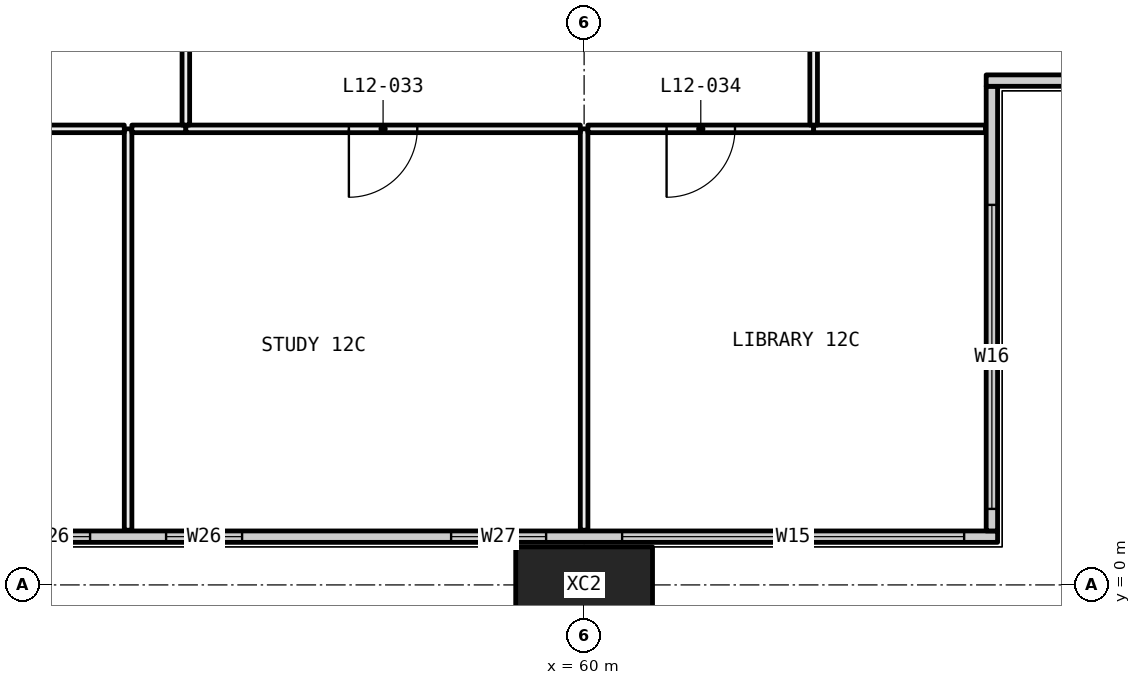
"""IFC4 building model, lengths in metres.
Left out: names, types, materials, properties, quantities, classifications, styles, units other than length and angle.
Written with IfcOpenShell. Run it as: python <this file> out.ifc"""

import sys

from ifc_helpers import new_model, si_unit, direction, frame, frame_2d, origin, origin_2d, place, context, subcontext, project, spatial, rectangle, hollow_rectangle, extrude, element, fill, save


model = new_model("IFC4")
c1 = context("Model", 3, precision=1e-05, world=origin(), true_north=direction((0.0, 1.0)))
c2 = subcontext(c1, "Body", "Model", "MODEL_VIEW")
j1 = project(units=[si_unit("LENGTHUNIT", "METRE"), si_unit("PLANEANGLEUNIT", "RADIAN")], contexts=[c1])
p1 = place(None, origin())
s1 = spatial("IfcSite", under=j1, at=p1, CompositionType="ELEMENT")
p2 = place(p1, origin())
s2 = spatial("IfcBuilding", under=s1, at=p2, CompositionType="ELEMENT")
p3 = place(p2, frame((0.0, 0.0, 54.15)))
s3 = spatial("IfcBuildingStorey", under=s2, at=p3, CompositionType="ELEMENT", Elevation=54.15)
p4 = place(p3, frame((60.0, 0.0, -0.4), z_axis=(0.0, 0.0, 1.0), x_axis=(1.0, 0.0, 0.0)))
e1 = element("IfcColumn", 1, at=p4, inside=s3, PredefinedType="COLUMN", context=c2, shape_type="SweptSolid", body=[
    extrude(hollow_rectangle(XDim=1.8, YDim=1.0, WallThickness=0.07, at=origin_2d()), origin(), (0.0, 0.0, 1.0), 3.45),
])
p5 = place(p3, frame((6.56, 0.635, 0.0), z_axis=(0.0, 0.0, 1.0), x_axis=(1.0, 0.0, 0.0)))
e2 = element("IfcWall", 2, at=p5, inside=s3, PredefinedType="ELEMENTEDWALL", context=c2, shape_type="SweptSolid", body=[
    extrude(rectangle(XDim=58.88, YDim=0.15, at=frame_2d((29.44, 0.0))), origin(), (0.0, 0.0, 1.0), 3.05),
])
p6 = place(p5, frame((0.44, 0.0, 0.45)))
e3 = element("IfcOpeningElement", 3, at=p6, cuts=e2, PredefinedType="OPENING", context=c2, shape_type="SweptSolid", body=[
    extrude(rectangle(XDim=4.5, YDim=2.55, at=frame_2d((2.25, 1.275))), frame((0.0, 0.085, 0.0), z_axis=(0.0, -1.0, 0.0), x_axis=(1.0, 0.0, 0.0)), (0.0, 0.0, 1.0), 0.17),
])
p7 = place(p5, frame((5.94, 0.0, 0.45)))
e4 = element("IfcOpeningElement", 4, at=p7, cuts=e2, PredefinedType="OPENING", context=c2, shape_type="SweptSolid", body=[
    extrude(rectangle(XDim=1.25, YDim=2.55, at=frame_2d((0.625, 1.275))), frame((0.0, 0.085, 0.0), z_axis=(0.0, -1.0, 0.0), x_axis=(1.0, 0.0, 0.0)), (0.0, 0.0, 1.0), 0.17),
])
p8 = place(p5, frame((9.94, 0.0, 0.45)))
e5 = element("IfcOpeningElement", 5, at=p8, cuts=e2, PredefinedType="OPENING", context=c2, shape_type="SweptSolid", body=[
    extrude(rectangle(XDim=1.0, YDim=2.55, at=frame_2d((0.5, 1.275))), frame((0.0, 0.085, 0.0), z_axis=(0.0, -1.0, 0.0), x_axis=(1.0, 0.0, 0.0)), (0.0, 0.0, 1.0), 0.17),
])
p9 = place(p5, frame((11.94, 0.0, 0.45)))
e6 = element("IfcOpeningElement", 6, at=p9, cuts=e2, PredefinedType="OPENING", context=c2, shape_type="SweptSolid", body=[
    extrude(rectangle(XDim=1.0, YDim=2.55, at=frame_2d((0.5, 1.275))), frame((0.0, 0.085, 0.0), z_axis=(0.0, -1.0, 0.0), x_axis=(1.0, 0.0, 0.0)), (0.0, 0.0, 1.0), 0.17),
])
p10 = place(p5, frame((15.69, 0.0, 0.45)))
e7 = element("IfcOpeningElement", 7, at=p10, cuts=e2, PredefinedType="OPENING", context=c2, shape_type="SweptSolid", body=[
    extrude(rectangle(XDim=1.25, YDim=2.55, at=frame_2d((0.625, 1.275))), frame((0.0, 0.085, 0.0), z_axis=(0.0, -1.0, 0.0), x_axis=(1.0, 0.0, 0.0)), (0.0, 0.0, 1.0), 0.17),
])
p11 = place(p5, frame((17.94, 0.0, 0.45)))
e8 = element("IfcOpeningElement", 8, at=p11, cuts=e2, PredefinedType="OPENING", context=c2, shape_type="SweptSolid", body=[
    extrude(rectangle(XDim=1.25, YDim=2.55, at=frame_2d((0.625, 1.275))), frame((0.0, 0.085, 0.0), z_axis=(0.0, -1.0, 0.0), x_axis=(1.0, 0.0, 0.0)), (0.0, 0.0, 1.0), 0.17),
])
p12 = place(p5, frame((21.94, 0.0, 0.45)))
e9 = element("IfcOpeningElement", 9, at=p12, cuts=e2, PredefinedType="OPENING", context=c2, shape_type="SweptSolid", body=[
    extrude(rectangle(XDim=1.0, YDim=2.55, at=frame_2d((0.5, 1.275))), frame((0.0, 0.085, 0.0), z_axis=(0.0, -1.0, 0.0), x_axis=(1.0, 0.0, 0.0)), (0.0, 0.0, 1.0), 0.17),
])
p13 = place(p5, frame((23.94, 0.0, 0.45)))
e10 = element("IfcOpeningElement", 10, at=p13, cuts=e2, PredefinedType="OPENING", context=c2, shape_type="SweptSolid", body=[
    extrude(rectangle(XDim=1.0, YDim=2.55, at=frame_2d((0.5, 1.275))), frame((0.0, 0.085, 0.0), z_axis=(0.0, -1.0, 0.0), x_axis=(1.0, 0.0, 0.0)), (0.0, 0.0, 1.0), 0.17),
])
p14 = place(p5, frame((27.69, 0.0, 0.45)))
e11 = element("IfcOpeningElement", 11, at=p14, cuts=e2, PredefinedType="OPENING", context=c2, shape_type="SweptSolid", body=[
    extrude(rectangle(XDim=1.25, YDim=2.55, at=frame_2d((0.625, 1.275))), frame((0.0, 0.085, 0.0), z_axis=(0.0, -1.0, 0.0), x_axis=(1.0, 0.0, 0.0)), (0.0, 0.0, 1.0), 0.17),
])
p15 = place(p5, frame((29.94, 0.0, 0.45)))
e12 = element("IfcOpeningElement", 12, at=p15, cuts=e2, PredefinedType="OPENING", context=c2, shape_type="SweptSolid", body=[
    extrude(rectangle(XDim=1.25, YDim=2.55, at=frame_2d((0.625, 1.275))), frame((0.0, 0.085, 0.0), z_axis=(0.0, -1.0, 0.0), x_axis=(1.0, 0.0, 0.0)), (0.0, 0.0, 1.0), 0.17),
])
p16 = place(p5, frame((33.94, 0.0, 0.45)))
e13 = element("IfcOpeningElement", 13, at=p16, cuts=e2, PredefinedType="OPENING", context=c2, shape_type="SweptSolid", body=[
    extrude(rectangle(XDim=1.0, YDim=2.55, at=frame_2d((0.5, 1.275))), frame((0.0, 0.085, 0.0), z_axis=(0.0, -1.0, 0.0), x_axis=(1.0, 0.0, 0.0)), (0.0, 0.0, 1.0), 0.17),
])
p17 = place(p5, frame((35.94, 0.0, 0.45)))
e14 = element("IfcOpeningElement", 14, at=p17, cuts=e2, PredefinedType="OPENING", context=c2, shape_type="SweptSolid", body=[
    extrude(rectangle(XDim=1.0, YDim=2.55, at=frame_2d((0.5, 1.275))), frame((0.0, 0.085, 0.0), z_axis=(0.0, -1.0, 0.0), x_axis=(1.0, 0.0, 0.0)), (0.0, 0.0, 1.0), 0.17),
])
p18 = place(p5, frame((39.69, 0.0, 0.45)))
e15 = element("IfcOpeningElement", 15, at=p18, cuts=e2, PredefinedType="OPENING", context=c2, shape_type="SweptSolid", body=[
    extrude(rectangle(XDim=1.25, YDim=2.55, at=frame_2d((0.625, 1.275))), frame((0.0, 0.085, 0.0), z_axis=(0.0, -1.0, 0.0), x_axis=(1.0, 0.0, 0.0)), (0.0, 0.0, 1.0), 0.17),
])
p19 = place(p5, frame((41.94, 0.0, 0.45)))
e16 = element("IfcOpeningElement", 16, at=p19, cuts=e2, PredefinedType="OPENING", context=c2, shape_type="SweptSolid", body=[
    extrude(rectangle(XDim=1.25, YDim=2.55, at=frame_2d((0.625, 1.275))), frame((0.0, 0.085, 0.0), z_axis=(0.0, -1.0, 0.0), x_axis=(1.0, 0.0, 0.0)), (0.0, 0.0, 1.0), 0.17),
])
p20 = place(p5, frame((45.94, 0.0, 0.45)))
e17 = element("IfcOpeningElement", 17, at=p20, cuts=e2, PredefinedType="OPENING", context=c2, shape_type="SweptSolid", body=[
    extrude(rectangle(XDim=1.0, YDim=2.55, at=frame_2d((0.5, 1.275))), frame((0.0, 0.085, 0.0), z_axis=(0.0, -1.0, 0.0), x_axis=(1.0, 0.0, 0.0)), (0.0, 0.0, 1.0), 0.17),
])
p21 = place(p5, frame((47.94, 0.0, 0.45)))
e18 = element("IfcOpeningElement", 18, at=p21, cuts=e2, PredefinedType="OPENING", context=c2, shape_type="SweptSolid", body=[
    extrude(rectangle(XDim=1.0, YDim=2.55, at=frame_2d((0.5, 1.275))), frame((0.0, 0.085, 0.0), z_axis=(0.0, -1.0, 0.0), x_axis=(1.0, 0.0, 0.0)), (0.0, 0.0, 1.0), 0.17),
])
p22 = place(p5, frame((51.69, 0.0, 0.45)))
e19 = element("IfcOpeningElement", 19, at=p22, cuts=e2, PredefinedType="OPENING", context=c2, shape_type="SweptSolid", body=[
    extrude(rectangle(XDim=1.25, YDim=2.55, at=frame_2d((0.625, 1.275))), frame((0.0, 0.085, 0.0), z_axis=(0.0, -1.0, 0.0), x_axis=(1.0, 0.0, 0.0)), (0.0, 0.0, 1.0), 0.17),
])
p23 = place(p5, frame((53.94, 0.0, 0.45)))
e20 = element("IfcOpeningElement", 20, at=p23, cuts=e2, PredefinedType="OPENING", context=c2, shape_type="SweptSolid", body=[
    extrude(rectangle(XDim=4.5, YDim=2.55, at=frame_2d((2.25, 1.275))), frame((0.0, 0.085, 0.0), z_axis=(0.0, -1.0, 0.0), x_axis=(1.0, 0.0, 0.0)), (0.0, 0.0, 1.0), 0.17),
])
p24 = place(p3, frame((65.365, 0.71, 0.0), z_axis=(0.0, 0.0, 1.0), x_axis=(0.0, 1.0, 0.0)))
e21 = element("IfcWall", 21, at=p24, inside=s3, PredefinedType="ELEMENTEDWALL", context=c2, shape_type="SweptSolid", body=[
    extrude(rectangle(XDim=5.85, YDim=0.15, at=frame_2d((2.925, 0.0))), origin(), (0.0, 0.0, 1.0), 3.05),
])
p25 = place(p24, frame((0.29, 0.0, 0.45)))
e22 = element("IfcOpeningElement", 22, at=p25, cuts=e21, PredefinedType="OPENING", context=c2, shape_type="SweptSolid", body=[
    extrude(rectangle(XDim=4.0, YDim=2.55, at=frame_2d((2.0, 1.275))), frame((0.0, 0.085, 0.0), z_axis=(0.0, -1.0, 0.0), x_axis=(1.0, 0.0, 0.0)), (0.0, 0.0, 1.0), 0.17),
])
p26 = place(p3, frame((65.29, 6.635, 0.0), z_axis=(0.0, 0.0, 1.0), x_axis=(1.0, 0.0, 0.0)))
e23 = element("IfcWall", 23, at=p26, inside=s3, PredefinedType="ELEMENTEDWALL", context=c2, shape_type="SweptSolid", body=[
    extrude(rectangle(XDim=6.15, YDim=0.15, at=frame_2d((3.075, 0.0))), origin(), (0.0, 0.0, 1.0), 3.05),
])
p27 = place(p26, frame((1.71, 0.0, 0.45)))
e24 = element("IfcOpeningElement", 24, at=p27, cuts=e23, PredefinedType="OPENING", context=c2, shape_type="SweptSolid", body=[
    extrude(rectangle(XDim=4.0, YDim=2.55, at=frame_2d((2.0, 1.275))), frame((0.0, 0.085, 0.0), z_axis=(0.0, -1.0, 0.0), x_axis=(1.0, 0.0, 0.0)), (0.0, 0.0, 1.0), 0.17),
])
p28 = place(p3, frame((54.0, 0.72, 0.0), z_axis=(0.0, 0.0, 1.0), x_axis=(0.0, 1.0, 0.0)))
e25 = element("IfcWall", 25, at=p28, inside=s3, PredefinedType="PARTITIONING", context=c2, shape_type="SweptSolid", body=[
    extrude(rectangle(XDim=5.28, YDim=0.1, at=frame_2d((2.64, 0.0))), origin(), (0.0, 0.0, 1.0), 3.05),
])
p29 = place(p3, frame((53.95, 6.0, 0.0), z_axis=(0.0, 0.0, 1.0), x_axis=(-1.0, 0.0, 0.0)))
e26 = element("IfcWall", 26, at=p29, inside=s3, PredefinedType="PARTITIONING", context=c2, shape_type="SweptSolid", body=[
    extrude(rectangle(XDim=5.9, YDim=0.1, at=frame_2d((2.95, 0.0))), origin(), (0.0, 0.0, 1.0), 2.45),
])
p30 = place(p29, frame((2.5, 0.0, 0.0)))
e27 = element("IfcOpeningElement", 27, at=p30, cuts=e26, PredefinedType="OPENING", context=c2, shape_type="SweptSolid", body=[
    extrude(rectangle(XDim=0.9, YDim=2.1, at=frame_2d((0.45, 1.05))), frame((0.0, 0.06, 0.0), z_axis=(0.0, -1.0, 0.0), x_axis=(1.0, 0.0, 0.0)), (0.0, 0.0, 1.0), 0.12),
])
p31 = place(p3, frame((60.0, 0.72, 0.0), z_axis=(0.0, 0.0, 1.0), x_axis=(0.0, 1.0, 0.0)))
e28 = element("IfcWall", 28, at=p31, inside=s3, PredefinedType="PARTITIONING", context=c2, shape_type="SweptSolid", body=[
    extrude(rectangle(XDim=5.28, YDim=0.1, at=frame_2d((2.64, 0.0))), origin(), (0.0, 0.0, 1.0), 2.45),
])
p32 = place(p3, frame((54.76, 6.0, 0.0), z_axis=(0.0, 0.0, 1.0), x_axis=(-1.0, 0.0, 0.0)))
e29 = element("IfcWall", 29, at=p32, inside=s3, PredefinedType="PARTITIONING", context=c2, shape_type="SweptSolid", body=[
    extrude(rectangle(XDim=0.71, YDim=0.1, at=frame_2d((0.355, 0.0))), origin(), (0.0, 0.0, 1.0), 3.05),
])
p33 = place(p3, frame((59.95, 6.0, 0.0), z_axis=(0.0, 0.0, 1.0), x_axis=(-1.0, 0.0, 0.0)))
e30 = element("IfcWall", 30, at=p33, inside=s3, PredefinedType="PARTITIONING", context=c2, shape_type="SweptSolid", body=[
    extrude(rectangle(XDim=5.19, YDim=0.1, at=frame_2d((2.595, 0.0))), origin(), (0.0, 0.0, 1.0), 2.45),
])
p34 = place(p33, frame((2.145, 0.0, 0.0)))
e31 = element("IfcOpeningElement", 31, at=p34, cuts=e30, PredefinedType="OPENING", context=c2, shape_type="SweptSolid", body=[
    extrude(rectangle(XDim=0.9, YDim=2.1, at=frame_2d((0.45, 1.05))), frame((0.0, 0.06, 0.0), z_axis=(0.0, -1.0, 0.0), x_axis=(1.0, 0.0, 0.0)), (0.0, 0.0, 1.0), 0.12),
])
p35 = place(p3, frame((63.02, 6.0, 0.0), z_axis=(0.0, 0.0, 1.0), x_axis=(-1.0, 0.0, 0.0)))
e32 = element("IfcWall", 32, at=p35, inside=s3, PredefinedType="PARTITIONING", context=c2, shape_type="SweptSolid", body=[
    extrude(rectangle(XDim=2.97, YDim=0.1, at=frame_2d((1.485, 0.0))), origin(), (0.0, 0.0, 1.0), 2.45),
])
p36 = place(p35, frame((1.035, 0.0, 0.0)))
e33 = element("IfcOpeningElement", 33, at=p36, cuts=e32, PredefinedType="OPENING", context=c2, shape_type="SweptSolid", body=[
    extrude(rectangle(XDim=0.9, YDim=2.1, at=frame_2d((0.45, 1.05))), frame((0.0, 0.06, 0.0), z_axis=(0.0, -1.0, 0.0), x_axis=(1.0, 0.0, 0.0)), (0.0, 0.0, 1.0), 0.12),
])
p37 = place(p3, frame((65.28, 6.0, 0.0), z_axis=(0.0, 0.0, 1.0), x_axis=(-1.0, 0.0, 0.0)))
e34 = element("IfcWall", 34, at=p37, inside=s3, PredefinedType="PARTITIONING", context=c2, shape_type="SweptSolid", body=[
    extrude(rectangle(XDim=2.26, YDim=0.1, at=frame_2d((1.13, 0.0))), origin(), (0.0, 0.0, 1.0), 3.05),
])
p38 = place(p3, frame((54.76, 6.05, 0.0), z_axis=(0.0, 0.0, 1.0), x_axis=(0.0, 1.0, 0.0)))
e35 = element("IfcWall", 35, at=p38, inside=s3, PredefinedType="PARTITIONING", context=c2, shape_type="SweptSolid", body=[
    extrude(rectangle(XDim=5.95, YDim=0.1, at=frame_2d((2.975, 0.0))), origin(), (0.0, 0.0, 1.0), 2.45),
])
p39 = place(p3, frame((63.02, 6.05, 0.0), z_axis=(0.0, 0.0, 1.0), x_axis=(0.0, 1.0, 0.0)))
e36 = element("IfcWall", 36, at=p39, inside=s3, PredefinedType="PARTITIONING", context=c2, shape_type="SweptSolid", body=[
    extrude(rectangle(XDim=5.95, YDim=0.1, at=frame_2d((2.975, 0.0))), origin(), (0.0, 0.0, 1.0), 2.45),
])
p40 = place(p39, frame((2.525, 0.0, 0.0)))
e37 = element("IfcOpeningElement", 37, at=p40, cuts=e36, PredefinedType="OPENING", context=c2, shape_type="SweptSolid", body=[
    extrude(rectangle(XDim=0.9, YDim=2.1, at=frame_2d((0.45, 1.05))), frame((0.0, 0.06, 0.0), z_axis=(0.0, -1.0, 0.0), x_axis=(1.0, 0.0, 0.0)), (0.0, 0.0, 1.0), 0.12),
])
p41 = place(p20, origin())
e38 = element("IfcWindow", 38, at=p41, inside=s3, PartitioningType="SINGLE_PANEL", PredefinedType="WINDOW", context=c2, shape_type="SweptSolid", body=[
    extrude(rectangle(XDim=1.0, YDim=2.55, at=frame_2d((0.5, 1.275))), frame((0.0, 0.03, 0.0), z_axis=(0.0, -1.0, 0.0), x_axis=(1.0, 0.0, 0.0)), (0.0, 0.0, 1.0), 0.06),
])
fill(e17, e38)
p42 = place(p21, origin())
e39 = element("IfcWindow", 39, at=p42, inside=s3, PartitioningType="SINGLE_PANEL", PredefinedType="WINDOW", context=c2, shape_type="SweptSolid", body=[
    extrude(rectangle(XDim=1.0, YDim=2.55, at=frame_2d((0.5, 1.275))), frame((0.0, 0.03, 0.0), z_axis=(0.0, -1.0, 0.0), x_axis=(1.0, 0.0, 0.0)), (0.0, 0.0, 1.0), 0.06),
])
fill(e18, e39)
p43 = place(p22, origin())
e40 = element("IfcWindow", 40, at=p43, inside=s3, PartitioningType="SINGLE_PANEL", PredefinedType="WINDOW", context=c2, shape_type="SweptSolid", body=[
    extrude(rectangle(XDim=1.25, YDim=2.55, at=frame_2d((0.625, 1.275))), frame((0.0, 0.03, 0.0), z_axis=(0.0, -1.0, 0.0), x_axis=(1.0, 0.0, 0.0)), (0.0, 0.0, 1.0), 0.06),
])
fill(e19, e40)
p44 = place(p23, origin())
e41 = element("IfcWindow", 41, at=p44, inside=s3, PartitioningType="SINGLE_PANEL", PredefinedType="WINDOW", context=c2, shape_type="SweptSolid", body=[
    extrude(rectangle(XDim=4.5, YDim=2.55, at=frame_2d((2.25, 1.275))), frame((0.0, 0.03, 0.0), z_axis=(0.0, -1.0, 0.0), x_axis=(1.0, 0.0, 0.0)), (0.0, 0.0, 1.0), 0.06),
])
fill(e20, e41)
p45 = place(p25, origin())
e42 = element("IfcWindow", 42, at=p45, inside=s3, PartitioningType="SINGLE_PANEL", PredefinedType="WINDOW", context=c2, shape_type="SweptSolid", body=[
    extrude(rectangle(XDim=4.0, YDim=2.55, at=frame_2d((2.0, 1.275))), frame((0.0, 0.03, 0.0), z_axis=(0.0, -1.0, 0.0), x_axis=(1.0, 0.0, 0.0)), (0.0, 0.0, 1.0), 0.06),
])
fill(e22, e42)
p46 = place(p34, origin())
e43 = element("IfcDoor", 43, at=p46, inside=s3, OperationType="SINGLE_SWING_LEFT", PredefinedType="DOOR", context=c2, shape_type="SweptSolid", body=[
    extrude(rectangle(XDim=0.9, YDim=2.1, at=frame_2d((0.45, 1.05))), frame((0.0, 0.025, 0.0), z_axis=(0.0, -1.0, 0.0), x_axis=(1.0, 0.0, 0.0)), (0.0, 0.0, 1.0), 0.05),
])
fill(e31, e43)
p47 = place(p36, origin())
e44 = element("IfcDoor", 44, at=p47, inside=s3, OperationType="SINGLE_SWING_LEFT", PredefinedType="DOOR", context=c2, shape_type="SweptSolid", body=[
    extrude(rectangle(XDim=0.9, YDim=2.1, at=frame_2d((0.45, 1.05))), frame((0.0, 0.025, 0.0), z_axis=(0.0, -1.0, 0.0), x_axis=(1.0, 0.0, 0.0)), (0.0, 0.0, 1.0), 0.05),
])
fill(e33, e44)
save(model, sys.argv[1])
